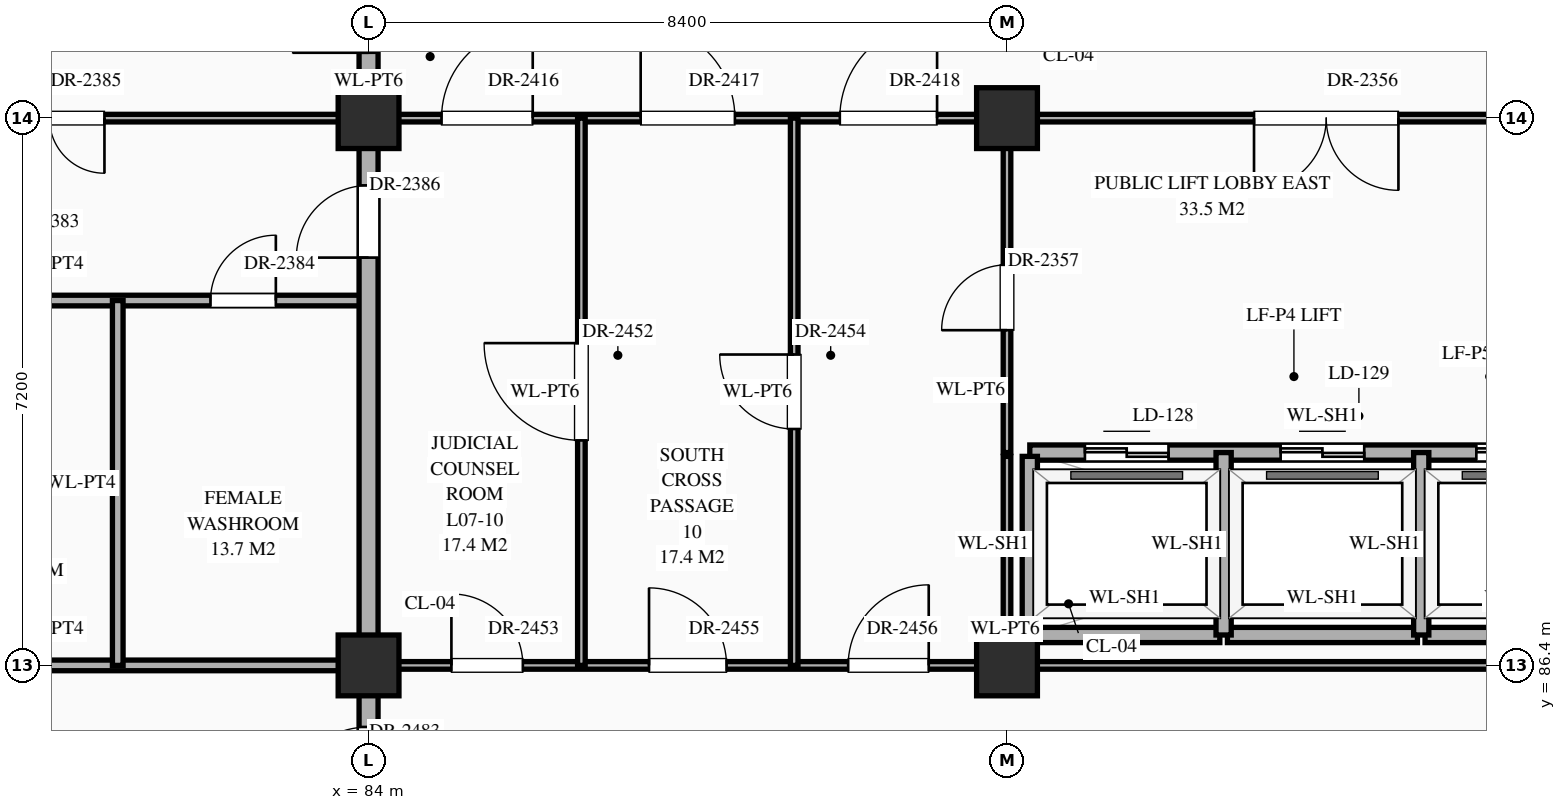
"""IFC4 building model, lengths in metres.
Left out: names, types, materials, properties, quantities, classifications, styles, units other than length and angle.
Written with IfcOpenShell. Run it as: python <this file> out.ifc"""

import sys

from ifc_helpers import new_model, si_unit, direction, frame, frame_2d, origin, origin_2d, place, context, subcontext, project, spatial, rectangle, extrude, element, fill, save


model = new_model("IFC4")
c1 = context("Model", 3, precision=1e-05, world=origin(), true_north=direction((0.0, 1.0)))
c2 = subcontext(c1, "Body", "Model", "MODEL_VIEW")
j1 = project(units=[si_unit("LENGTHUNIT", "METRE"), si_unit("PLANEANGLEUNIT", "RADIAN")], contexts=[c1])
p1 = place(None, origin())
s1 = spatial("IfcSite", under=j1, at=p1, CompositionType="ELEMENT")
p2 = place(p1, origin())
s2 = spatial("IfcBuilding", under=s1, at=p2, CompositionType="ELEMENT")
p3 = place(p2, frame((0.0, 0.0, 30.6)))
s3 = spatial("IfcBuildingStorey", under=s2, at=p3, CompositionType="ELEMENT", Elevation=30.6)
for number, where, z_axis, x_axis in (
    (1, (84.0, 86.4, 0.0), (0.0, 0.0, 1.0), (1.0, 0.0, 0.0)),
    (2, (84.0, 93.6, 0.0), (0.0, 0.0, 1.0), (1.0, 0.0, 0.0)),
    (3, (92.4, 86.4, 0.0), (0.0, 0.0, 1.0), (1.0, 0.0, 0.0)),
    (4, (92.4, 93.6, 0.0), (0.0, 0.0, 1.0), (1.0, 0.0, 0.0)),
):
    element("IfcColumn", number, at=place(p3, frame(where, z_axis=z_axis, x_axis=x_axis)), inside=s3, PredefinedType="COLUMN", context=c2, shape_type="SweptSolid", body=[
        extrude(rectangle(XDim=0.8, YDim=0.8, at=origin_2d()), origin(), (0.0, 0.0, 1.0), 4.5),
    ])
p4 = place(p3, frame((75.6, 86.4, 0.0), z_axis=(0.0, 0.0, 1.0), x_axis=(1.0, 0.0, 0.0)))
e5 = element("IfcWall", 5, at=p4, inside=s3, PredefinedType="STANDARD", context=c2, shape_type="SweptSolid", body=[
    extrude(rectangle(XDim=8.4, YDim=0.14, at=frame_2d((4.2, 0.0))), origin(), (0.0, 0.0, 1.0), 3.39),
])
p5 = place(p3, frame((84.0, 86.4, 0.0), z_axis=(0.0, 0.0, 1.0), x_axis=(1.0, 0.0, 0.0)))
e6 = element("IfcWall", 6, at=p5, inside=s3, PredefinedType="STANDARD", context=c2, shape_type="SweptSolid", body=[
    extrude(rectangle(XDim=8.4, YDim=0.1, at=frame_2d((4.2, 0.0))), origin(), (0.0, 0.0, 1.0), 3.39),
])
p6 = place(p5, frame((1.09, 0.0, 0.0)))
e7 = element("IfcOpeningElement", 7, at=p6, cuts=e6, PredefinedType="OPENING", context=c2, shape_type="SweptSolid", body=[
    extrude(rectangle(XDim=0.94, YDim=2.3, at=frame_2d((0.47, 1.15))), frame((0.0, 0.062, 0.0), z_axis=(0.0, -1.0, 0.0), x_axis=(1.0, 0.0, 0.0)), (0.0, 0.0, 1.0), 0.124),
])
p7 = place(p5, frame((3.69, 0.0, 0.0)))
e8 = element("IfcOpeningElement", 8, at=p7, cuts=e6, PredefinedType="OPENING", context=c2, shape_type="SweptSolid", body=[
    extrude(rectangle(XDim=1.02, YDim=2.4, at=frame_2d((0.51, 1.2))), frame((0.0, 0.062, 0.0), z_axis=(0.0, -1.0, 0.0), x_axis=(1.0, 0.0, 0.0)), (0.0, 0.0, 1.0), 0.124),
])
p8 = place(p5, frame((6.31, 0.0, 0.0)))
e9 = element("IfcOpeningElement", 9, at=p8, cuts=e6, PredefinedType="OPENING", context=c2, shape_type="SweptSolid", body=[
    extrude(rectangle(XDim=1.06, YDim=2.4, at=frame_2d((0.53, 1.2))), frame((0.0, 0.062, 0.0), z_axis=(0.0, -1.0, 0.0), x_axis=(1.0, 0.0, 0.0)), (0.0, 0.0, 1.0), 0.124),
])
p9 = place(p3, frame((92.45, 86.4, 0.0), z_axis=(0.0, 0.0, 1.0), x_axis=(1.0, 0.0, 0.0)))
e10 = element("IfcWall", 10, at=p9, inside=s3, PredefinedType="STANDARD", context=c2, shape_type="SweptSolid", body=[
    extrude(rectangle(XDim=8.3, YDim=0.1, at=frame_2d((4.15, 0.0))), origin(), (0.0, 0.0, 1.0), 3.39),
])
for number, where, z_axis, x_axis in (
    (11, (92.7, 86.8, 0.0), (0.0, 0.0, 1.0), (1.0, 0.0, 0.0)),
    (12, (95.3, 86.8, 0.0), (0.0, 0.0, 1.0), (1.0, 0.0, 0.0)),
    (13, (97.9, 86.8, 0.0), (0.0, 0.0, 1.0), (1.0, 0.0, 0.0)),
):
    element("IfcWall", number, at=place(p3, frame(where, z_axis=z_axis, x_axis=x_axis)), inside=s3, PredefinedType="STANDARD", context=c2, shape_type="SweptSolid", body=[
        extrude(rectangle(XDim=2.5, YDim=0.2, at=frame_2d((1.25, 0.0))), origin(), (0.0, 0.0, 1.0), 4.24),
    ])
p10 = place(p3, frame((92.7, 89.2, 0.0), z_axis=(0.0, 0.0, 1.0), x_axis=(1.0, 0.0, 0.0)))
e14 = element("IfcWall", 14, at=p10, inside=s3, PredefinedType="STANDARD", context=c2, shape_type="SweptSolid", body=[
    extrude(rectangle(XDim=7.7, YDim=0.2, at=frame_2d((3.85, 0.0))), origin(), (0.0, 0.0, 1.0), 4.24),
])
p11 = place(p10, frame((0.725, 0.0, 0.0)))
e15 = element("IfcOpeningElement", 15, at=p11, cuts=e14, PredefinedType="OPENING", context=c2, shape_type="SweptSolid", body=[
    extrude(rectangle(XDim=1.1, YDim=2.15, at=frame_2d((0.55, 1.075))), frame((0.0, 0.112, 0.0), z_axis=(0.0, -1.0, 0.0), x_axis=(1.0, 0.0, 0.0)), (0.0, 0.0, 1.0), 0.224),
])
p12 = place(p10, frame((3.3, 0.0, 0.0)))
e16 = element("IfcOpeningElement", 16, at=p12, cuts=e14, PredefinedType="OPENING", context=c2, shape_type="SweptSolid", body=[
    extrude(rectangle(XDim=1.1, YDim=2.15, at=frame_2d((0.55, 1.075))), frame((0.0, 0.112, 0.0), z_axis=(0.0, -1.0, 0.0), x_axis=(1.0, 0.0, 0.0)), (0.0, 0.0, 1.0), 0.224),
])
p13 = place(p10, frame((5.875, 0.0, 0.0)))
e17 = element("IfcOpeningElement", 17, at=p13, cuts=e14, PredefinedType="OPENING", context=c2, shape_type="SweptSolid", body=[
    extrude(rectangle(XDim=1.1, YDim=2.15, at=frame_2d((0.55, 1.075))), frame((0.0, 0.112, 0.0), z_axis=(0.0, -1.0, 0.0), x_axis=(1.0, 0.0, 0.0)), (0.0, 0.0, 1.0), 0.224),
])
p14 = place(p3, frame((75.6, 91.2, 0.0), z_axis=(0.0, 0.0, 1.0), x_axis=(1.0, 0.0, 0.0)))
e18 = element("IfcWall", 18, at=p14, inside=s3, PredefinedType="STANDARD", context=c2, shape_type="SweptSolid", body=[
    extrude(rectangle(XDim=8.4, YDim=0.14, at=frame_2d((4.2, 0.0))), origin(), (0.0, 0.0, 1.0), 4.24),
])
p15 = place(p14, frame((0.65, 0.0, 0.0)))
e19 = element("IfcOpeningElement", 19, at=p15, cuts=e18, PredefinedType="OPENING", context=c2, shape_type="SweptSolid", body=[
    extrude(rectangle(XDim=0.9, YDim=2.15, at=frame_2d((0.45, 1.075))), frame((0.0, 0.082, 0.0), z_axis=(0.0, -1.0, 0.0), x_axis=(1.0, 0.0, 0.0)), (0.0, 0.0, 1.0), 0.164),
])
p16 = place(p14, frame((3.22, 0.0, 0.0)))
e20 = element("IfcOpeningElement", 20, at=p16, cuts=e18, PredefinedType="OPENING", context=c2, shape_type="SweptSolid", body=[
    extrude(rectangle(XDim=0.86, YDim=2.1, at=frame_2d((0.43, 1.05))), frame((0.0, 0.082, 0.0), z_axis=(0.0, -1.0, 0.0), x_axis=(1.0, 0.0, 0.0)), (0.0, 0.0, 1.0), 0.164),
])
p17 = place(p14, frame((6.32, 0.0, 0.0)))
e21 = element("IfcOpeningElement", 21, at=p17, cuts=e18, PredefinedType="OPENING", context=c2, shape_type="SweptSolid", body=[
    extrude(rectangle(XDim=0.86, YDim=2.1, at=frame_2d((0.43, 1.05))), frame((0.0, 0.082, 0.0), z_axis=(0.0, -1.0, 0.0), x_axis=(1.0, 0.0, 0.0)), (0.0, 0.0, 1.0), 0.164),
])
p18 = place(p3, frame((67.2, 93.6, 0.0), z_axis=(0.0, 0.0, 1.0), x_axis=(1.0, 0.0, 0.0)))
e22 = element("IfcWall", 22, at=p18, inside=s3, PredefinedType="STANDARD", context=c2, shape_type="SweptSolid", body=[
    extrude(rectangle(XDim=33.6, YDim=0.1, at=frame_2d((16.8, 0.0))), origin(), (0.0, 0.0, 1.0), 3.39),
])
p19 = place(p18, frame((3.475, 0.0, 0.0)))
e23 = element("IfcOpeningElement", 23, at=p19, cuts=e22, PredefinedType="OPENING", context=c2, shape_type="SweptSolid", body=[
    extrude(rectangle(XDim=1.45, YDim=2.3, at=frame_2d((0.725, 1.15))), frame((0.0, 0.062, 0.0), z_axis=(0.0, -1.0, 0.0), x_axis=(1.0, 0.0, 0.0)), (0.0, 0.0, 1.0), 0.124),
])
p20 = place(p18, frame((28.45, 0.0, 0.0)))
e24 = element("IfcOpeningElement", 24, at=p20, cuts=e22, PredefinedType="OPENING", context=c2, shape_type="SweptSolid", body=[
    extrude(rectangle(XDim=1.9, YDim=2.5, at=frame_2d((0.95, 1.25))), frame((0.0, 0.062, 0.0), z_axis=(0.0, -1.0, 0.0), x_axis=(1.0, 0.0, 0.0)), (0.0, 0.0, 1.0), 0.124),
])
p21 = place(p18, frame((11.875, 0.0, 0.0)))
e25 = element("IfcOpeningElement", 25, at=p21, cuts=e22, PredefinedType="OPENING", context=c2, shape_type="SweptSolid", body=[
    extrude(rectangle(XDim=1.45, YDim=2.3, at=frame_2d((0.725, 1.15))), frame((0.0, 0.062, 0.0), z_axis=(0.0, -1.0, 0.0), x_axis=(1.0, 0.0, 0.0)), (0.0, 0.0, 1.0), 0.124),
])
p22 = place(p18, frame((17.76, 0.0, 0.0)))
e26 = element("IfcOpeningElement", 26, at=p22, cuts=e22, PredefinedType="OPENING", context=c2, shape_type="SweptSolid", body=[
    extrude(rectangle(XDim=1.2, YDim=2.35, at=frame_2d((0.6, 1.175))), frame((0.0, 0.062, 0.0), z_axis=(0.0, -1.0, 0.0), x_axis=(1.0, 0.0, 0.0)), (0.0, 0.0, 1.0), 0.124),
])
p23 = place(p18, frame((20.38, 0.0, 0.0)))
e27 = element("IfcOpeningElement", 27, at=p23, cuts=e22, PredefinedType="OPENING", context=c2, shape_type="SweptSolid", body=[
    extrude(rectangle(XDim=1.24, YDim=2.3, at=frame_2d((0.62, 1.15))), frame((0.0, 0.062, 0.0), z_axis=(0.0, -1.0, 0.0), x_axis=(1.0, 0.0, 0.0)), (0.0, 0.0, 1.0), 0.124),
])
p24 = place(p18, frame((23.0, 0.0, 0.0)))
e28 = element("IfcOpeningElement", 28, at=p24, cuts=e22, PredefinedType="OPENING", context=c2, shape_type="SweptSolid", body=[
    extrude(rectangle(XDim=1.28, YDim=2.35, at=frame_2d((0.64, 1.175))), frame((0.0, 0.062, 0.0), z_axis=(0.0, -1.0, 0.0), x_axis=(1.0, 0.0, 0.0)), (0.0, 0.0, 1.0), 0.124),
])
p25 = place(p3, frame((80.7, 86.4, 0.0), z_axis=(0.0, 0.0, 1.0), x_axis=(0.0, 1.0, 0.0)))
e29 = element("IfcWall", 29, at=p25, inside=s3, PredefinedType="STANDARD", context=c2, shape_type="SweptSolid", body=[
    extrude(rectangle(XDim=4.8, YDim=0.14, at=frame_2d((2.4, 0.0))), origin(), (0.0, 0.0, 1.0), 4.24),
])
p26 = place(p3, frame((84.0, 79.24, 0.0), z_axis=(0.0, 0.0, 1.0), x_axis=(0.0, 1.0, 0.0)))
e30 = element("IfcWall", 30, at=p26, inside=s3, PredefinedType="STANDARD", context=c2, shape_type="SweptSolid", body=[
    extrude(rectangle(XDim=35.92, YDim=0.25, at=frame_2d((17.96, 0.0))), origin(), (0.0, 0.0, 1.0), 3.49),
])
p27 = place(p26, frame((22.77, 0.0, 0.0)))
e31 = element("IfcOpeningElement", 31, at=p27, cuts=e30, PredefinedType="OPENING", context=c2, shape_type="SweptSolid", body=[
    extrude(rectangle(XDim=1.5, YDim=2.25, at=frame_2d((0.75, 1.125))), frame((0.0, 0.137, 0.0), z_axis=(0.0, -1.0, 0.0), x_axis=(1.0, 0.0, 0.0)), (0.0, 0.0, 1.0), 0.274),
])
p28 = place(p26, frame((12.525, 0.0, 0.0)))
e32 = element("IfcOpeningElement", 32, at=p28, cuts=e30, PredefinedType="OPENING", context=c2, shape_type="SweptSolid", body=[
    extrude(rectangle(XDim=0.95, YDim=2.15, at=frame_2d((0.475, 1.075))), frame((0.0, 0.137, 0.0), z_axis=(0.0, -1.0, 0.0), x_axis=(1.0, 0.0, 0.0)), (0.0, 0.0, 1.0), 0.274),
])
p29 = place(p26, frame((15.22, 0.0, 0.0)))
e33 = element("IfcOpeningElement", 33, at=p29, cuts=e30, PredefinedType="OPENING", context=c2, shape_type="SweptSolid", body=[
    extrude(rectangle(XDim=1.0, YDim=2.2, at=frame_2d((0.5, 1.1))), frame((0.0, 0.137, 0.0), z_axis=(0.0, -1.0, 0.0), x_axis=(1.0, 0.0, 0.0)), (0.0, 0.0, 1.0), 0.274),
])
p30 = place(p26, frame((25.8, 0.0, 0.0)))
e34 = element("IfcOpeningElement", 34, at=p30, cuts=e30, PredefinedType="OPENING", context=c2, shape_type="SweptSolid", body=[
    extrude(rectangle(XDim=2.0, YDim=2.4, at=frame_2d((1.0, 1.2))), frame((0.0, 0.137, 0.0), z_axis=(0.0, -1.0, 0.0), x_axis=(1.0, 0.0, 0.0)), (0.0, 0.0, 1.0), 0.274),
])
p31 = place(p26, frame((29.57, 0.0, 0.0)))
e35 = element("IfcOpeningElement", 35, at=p31, cuts=e30, PredefinedType="OPENING", context=c2, shape_type="SweptSolid", body=[
    extrude(rectangle(XDim=1.1, YDim=2.2, at=frame_2d((0.55, 1.1))), frame((0.0, 0.137, 0.0), z_axis=(0.0, -1.0, 0.0), x_axis=(1.0, 0.0, 0.0)), (0.0, 0.0, 1.0), 0.274),
])
p32 = place(p26, frame((5.25, 0.0, 0.0)))
e36 = element("IfcOpeningElement", 36, at=p32, cuts=e30, PredefinedType="OPENING", context=c2, shape_type="SweptSolid", body=[
    extrude(rectangle(XDim=1.1, YDim=2.2, at=frame_2d((0.55, 1.1))), frame((0.0, 0.137, 0.0), z_axis=(0.0, -1.0, 0.0), x_axis=(1.0, 0.0, 0.0)), (0.0, 0.0, 1.0), 0.274),
])
p33 = place(p3, frame((86.8, 86.4, 0.0), z_axis=(0.0, 0.0, 1.0), x_axis=(0.0, 1.0, 0.0)))
e37 = element("IfcWall", 37, at=p33, inside=s3, PredefinedType="STANDARD", context=c2, shape_type="SweptSolid", body=[
    extrude(rectangle(XDim=7.2, YDim=0.1, at=frame_2d((3.6, 0.0))), origin(), (0.0, 0.0, 1.0), 4.24),
])
p34 = place(p33, frame((2.96, 0.0, 0.0)))
e38 = element("IfcOpeningElement", 38, at=p34, cuts=e37, PredefinedType="OPENING", context=c2, shape_type="SweptSolid", body=[
    extrude(rectangle(XDim=1.28, YDim=2.35, at=frame_2d((0.64, 1.175))), frame((0.0, 0.062, 0.0), z_axis=(0.0, -1.0, 0.0), x_axis=(1.0, 0.0, 0.0)), (0.0, 0.0, 1.0), 0.124),
])
p35 = place(p3, frame((89.6, 86.4, 0.0), z_axis=(0.0, 0.0, 1.0), x_axis=(0.0, 1.0, 0.0)))
e39 = element("IfcWall", 39, at=p35, inside=s3, PredefinedType="STANDARD", context=c2, shape_type="SweptSolid", body=[
    extrude(rectangle(XDim=7.2, YDim=0.1, at=frame_2d((3.6, 0.0))), origin(), (0.0, 0.0, 1.0), 4.24),
])
p36 = place(p35, frame((3.11, 0.0, 0.0)))
e40 = element("IfcOpeningElement", 40, at=p36, cuts=e39, PredefinedType="OPENING", context=c2, shape_type="SweptSolid", body=[
    extrude(rectangle(XDim=0.98, YDim=2.35, at=frame_2d((0.49, 1.175))), frame((0.0, 0.062, 0.0), z_axis=(0.0, -1.0, 0.0), x_axis=(1.0, 0.0, 0.0)), (0.0, 0.0, 1.0), 0.124),
])
p37 = place(p3, frame((92.4, 86.45, 0.0), z_axis=(0.0, 0.0, 1.0), x_axis=(0.0, 1.0, 0.0)))
e41 = element("IfcWall", 41, at=p37, inside=s3, PredefinedType="STANDARD", context=c2, shape_type="SweptSolid", body=[
    extrude(rectangle(XDim=2.7, YDim=0.1, at=frame_2d((1.35, 0.0))), origin(), (0.0, 0.0, 1.0), 3.49),
])
p38 = place(p3, frame((92.4, 89.2, 0.0), z_axis=(0.0, 0.0, 1.0), x_axis=(0.0, 1.0, 0.0)))
e42 = element("IfcWall", 42, at=p38, inside=s3, PredefinedType="STANDARD", context=c2, shape_type="SweptSolid", body=[
    extrude(rectangle(XDim=4.4, YDim=0.1, at=frame_2d((2.2, 0.0))), origin(), (0.0, 0.0, 1.0), 3.49),
])
p39 = place(p38, frame((1.61, 0.0, 0.0)))
e43 = element("IfcOpeningElement", 43, at=p39, cuts=e42, PredefinedType="OPENING", context=c2, shape_type="SweptSolid", body=[
    extrude(rectangle(XDim=0.86, YDim=2.1, at=frame_2d((0.43, 1.05))), frame((0.0, 0.062, 0.0), z_axis=(0.0, -1.0, 0.0), x_axis=(1.0, 0.0, 0.0)), (0.0, 0.0, 1.0), 0.124),
])
p40 = place(p3, frame((92.7, 86.85, 0.0), z_axis=(0.0, 0.0, 1.0), x_axis=(0.0, 1.0, 0.0)))
e44 = element("IfcWall", 44, at=p40, inside=s3, PredefinedType="STANDARD", context=c2, shape_type="SweptSolid", body=[
    extrude(rectangle(XDim=2.3, YDim=0.2, at=frame_2d((1.15, 0.0))), origin(), (0.0, 0.0, 1.0), 4.24),
])
for number, where, z_axis, x_axis in (
    (45, (95.25, 86.8, 0.0), (0.0, 0.0, 1.0), (0.0, 1.0, 0.0)),
    (46, (97.85, 86.8, 0.0), (0.0, 0.0, 1.0), (0.0, 1.0, 0.0)),
):
    element("IfcWall", number, at=place(p3, frame(where, z_axis=z_axis, x_axis=x_axis)), inside=s3, PredefinedType="STANDARD", context=c2, shape_type="SweptSolid", body=[
        extrude(rectangle(XDim=2.4, YDim=0.2, at=frame_2d((1.2, 0.0))), origin(), (0.0, 0.0, 1.0), 4.24),
    ])
p41 = place(p11, origin())
e47 = element("IfcDoor", 47, at=p41, inside=s3, OperationType="DOUBLE_DOOR_SLIDING", PredefinedType="DOOR", context=c2, shape_type="SweptSolid", body=[
    extrude(rectangle(XDim=1.1, YDim=2.15, at=frame_2d((0.55, 1.075))), frame((0.0, 0.025, 0.0), z_axis=(0.0, -1.0, 0.0), x_axis=(1.0, 0.0, 0.0)), (0.0, 0.0, 1.0), 0.05),
])
fill(e15, e47)
p42 = place(p12, origin())
e48 = element("IfcDoor", 48, at=p42, inside=s3, OperationType="DOUBLE_DOOR_SLIDING", PredefinedType="DOOR", context=c2, shape_type="SweptSolid", body=[
    extrude(rectangle(XDim=1.1, YDim=2.15, at=frame_2d((0.55, 1.075))), frame((0.0, 0.025, 0.0), z_axis=(0.0, -1.0, 0.0), x_axis=(1.0, 0.0, 0.0)), (0.0, 0.0, 1.0), 0.05),
])
fill(e16, e48)
p43 = place(p13, origin())
e49 = element("IfcDoor", 49, at=p43, inside=s3, OperationType="DOUBLE_DOOR_SLIDING", PredefinedType="DOOR", context=c2, shape_type="SweptSolid", body=[
    extrude(rectangle(XDim=1.1, YDim=2.15, at=frame_2d((0.55, 1.075))), frame((0.0, 0.025, 0.0), z_axis=(0.0, -1.0, 0.0), x_axis=(1.0, 0.0, 0.0)), (0.0, 0.0, 1.0), 0.05),
])
fill(e17, e49)
p44 = place(p20, frame((1.9, 0.0, 0.0), z_axis=(0.0, 0.0, 1.0), x_axis=(-1.0, 0.0, 0.0)))
e50 = element("IfcDoor", 50, at=p44, inside=s3, OperationType="DOUBLE_DOOR_SINGLE_SWING", PredefinedType="DOOR", context=c2, shape_type="SweptSolid", body=[
    extrude(rectangle(XDim=1.9, YDim=2.5, at=frame_2d((0.95, 1.25))), frame((0.0, 0.025, 0.0), z_axis=(0.0, -1.0, 0.0), x_axis=(1.0, 0.0, 0.0)), (0.0, 0.0, 1.0), 0.05),
])
fill(e24, e50)
p45 = place(p39, origin())
e51 = element("IfcDoor", 51, at=p45, inside=s3, OperationType="SINGLE_SWING_LEFT", PredefinedType="DOOR", context=c2, shape_type="SweptSolid", body=[
    extrude(rectangle(XDim=0.86, YDim=2.1, at=frame_2d((0.43, 1.05))), frame((0.0, 0.025, 0.0), z_axis=(0.0, -1.0, 0.0), x_axis=(1.0, 0.0, 0.0)), (0.0, 0.0, 1.0), 0.05),
])
fill(e43, e51)
p46 = place(p17, origin())
e52 = element("IfcDoor", 52, at=p46, inside=s3, OperationType="SINGLE_SWING_RIGHT", PredefinedType="DOOR", context=c2, shape_type="SweptSolid", body=[
    extrude(rectangle(XDim=0.86, YDim=2.1, at=frame_2d((0.43, 1.05))), frame((0.0, 0.025, 0.0), z_axis=(0.0, -1.0, 0.0), x_axis=(1.0, 0.0, 0.0)), (0.0, 0.0, 1.0), 0.05),
])
fill(e21, e52)
p47 = place(p21, frame((1.45, 0.0, 0.0), z_axis=(0.0, 0.0, 1.0), x_axis=(-1.0, 0.0, 0.0)))
e53 = element("IfcDoor", 53, at=p47, inside=s3, OperationType="DOUBLE_DOOR_SINGLE_SWING", PredefinedType="DOOR", context=c2, shape_type="SweptSolid", body=[
    extrude(rectangle(XDim=1.45, YDim=2.3, at=frame_2d((0.725, 1.15))), frame((0.0, 0.025, 0.0), z_axis=(0.0, -1.0, 0.0), x_axis=(1.0, 0.0, 0.0)), (0.0, 0.0, 1.0), 0.05),
])
fill(e25, e53)
p48 = place(p28, origin())
e54 = element("IfcDoor", 54, at=p48, inside=s3, OperationType="SINGLE_SWING_LEFT", PredefinedType="DOOR", context=c2, shape_type="SweptSolid", body=[
    extrude(rectangle(XDim=0.95, YDim=2.15, at=frame_2d((0.475, 1.075))), frame((0.0, 0.025, 0.0), z_axis=(0.0, -1.0, 0.0), x_axis=(1.0, 0.0, 0.0)), (0.0, 0.0, 1.0), 0.05),
])
fill(e32, e54)
p49 = place(p22, origin())
e55 = element("IfcDoor", 55, at=p49, inside=s3, OperationType="SINGLE_SWING_RIGHT", PredefinedType="DOOR", context=c2, shape_type="SweptSolid", body=[
    extrude(rectangle(XDim=1.2, YDim=2.35, at=frame_2d((0.6, 1.175))), frame((0.0, 0.025, 0.0), z_axis=(0.0, -1.0, 0.0), x_axis=(1.0, 0.0, 0.0)), (0.0, 0.0, 1.0), 0.05),
])
fill(e26, e55)
p50 = place(p23, origin())
e56 = element("IfcDoor", 56, at=p50, inside=s3, OperationType="SINGLE_SWING_LEFT", PredefinedType="DOOR", context=c2, shape_type="SweptSolid", body=[
    extrude(rectangle(XDim=1.24, YDim=2.3, at=frame_2d((0.62, 1.15))), frame((0.0, 0.025, 0.0), z_axis=(0.0, -1.0, 0.0), x_axis=(1.0, 0.0, 0.0)), (0.0, 0.0, 1.0), 0.05),
])
fill(e27, e56)
p51 = place(p24, origin())
e57 = element("IfcDoor", 57, at=p51, inside=s3, OperationType="SINGLE_SWING_RIGHT", PredefinedType="DOOR", context=c2, shape_type="SweptSolid", body=[
    extrude(rectangle(XDim=1.28, YDim=2.35, at=frame_2d((0.64, 1.175))), frame((0.0, 0.025, 0.0), z_axis=(0.0, -1.0, 0.0), x_axis=(1.0, 0.0, 0.0)), (0.0, 0.0, 1.0), 0.05),
])
fill(e28, e57)
p52 = place(p34, origin())
e58 = element("IfcDoor", 58, at=p52, inside=s3, OperationType="SINGLE_SWING_RIGHT", PredefinedType="DOOR", context=c2, shape_type="SweptSolid", body=[
    extrude(rectangle(XDim=1.28, YDim=2.35, at=frame_2d((0.64, 1.175))), frame((0.0, 0.025, 0.0), z_axis=(0.0, -1.0, 0.0), x_axis=(1.0, 0.0, 0.0)), (0.0, 0.0, 1.0), 0.05),
])
fill(e38, e58)
p53 = place(p6, origin())
e59 = element("IfcDoor", 59, at=p53, inside=s3, OperationType="SINGLE_SWING_LEFT", PredefinedType="DOOR", context=c2, shape_type="SweptSolid", body=[
    extrude(rectangle(XDim=0.94, YDim=2.3, at=frame_2d((0.47, 1.15))), frame((0.0, 0.025, 0.0), z_axis=(0.0, -1.0, 0.0), x_axis=(1.0, 0.0, 0.0)), (0.0, 0.0, 1.0), 0.05),
])
fill(e7, e59)
p54 = place(p36, origin())
e60 = element("IfcDoor", 60, at=p54, inside=s3, OperationType="SINGLE_SWING_RIGHT", PredefinedType="DOOR", context=c2, shape_type="SweptSolid", body=[
    extrude(rectangle(XDim=0.98, YDim=2.35, at=frame_2d((0.49, 1.175))), frame((0.0, 0.025, 0.0), z_axis=(0.0, -1.0, 0.0), x_axis=(1.0, 0.0, 0.0)), (0.0, 0.0, 1.0), 0.05),
])
fill(e40, e60)
p55 = place(p7, origin())
e61 = element("IfcDoor", 61, at=p55, inside=s3, OperationType="SINGLE_SWING_LEFT", PredefinedType="DOOR", context=c2, shape_type="SweptSolid", body=[
    extrude(rectangle(XDim=1.02, YDim=2.4, at=frame_2d((0.51, 1.2))), frame((0.0, 0.025, 0.0), z_axis=(0.0, -1.0, 0.0), x_axis=(1.0, 0.0, 0.0)), (0.0, 0.0, 1.0), 0.05),
])
fill(e8, e61)
p56 = place(p8, origin())
e62 = element("IfcDoor", 62, at=p56, inside=s3, OperationType="SINGLE_SWING_RIGHT", PredefinedType="DOOR", context=c2, shape_type="SweptSolid", body=[
    extrude(rectangle(XDim=1.06, YDim=2.4, at=frame_2d((0.53, 1.2))), frame((0.0, 0.025, 0.0), z_axis=(0.0, -1.0, 0.0), x_axis=(1.0, 0.0, 0.0)), (0.0, 0.0, 1.0), 0.05),
])
fill(e9, e62)
p57 = place(p32, origin())
e63 = element("IfcDoor", 63, at=p57, inside=s3, OperationType="SINGLE_SWING_LEFT", PredefinedType="DOOR", context=c2, shape_type="SweptSolid", body=[
    extrude(rectangle(XDim=1.1, YDim=2.2, at=frame_2d((0.55, 1.1))), frame((0.0, 0.025, 0.0), z_axis=(0.0, -1.0, 0.0), x_axis=(1.0, 0.0, 0.0)), (0.0, 0.0, 1.0), 0.05),
])
fill(e36, e63)
save(model, sys.argv[1])
